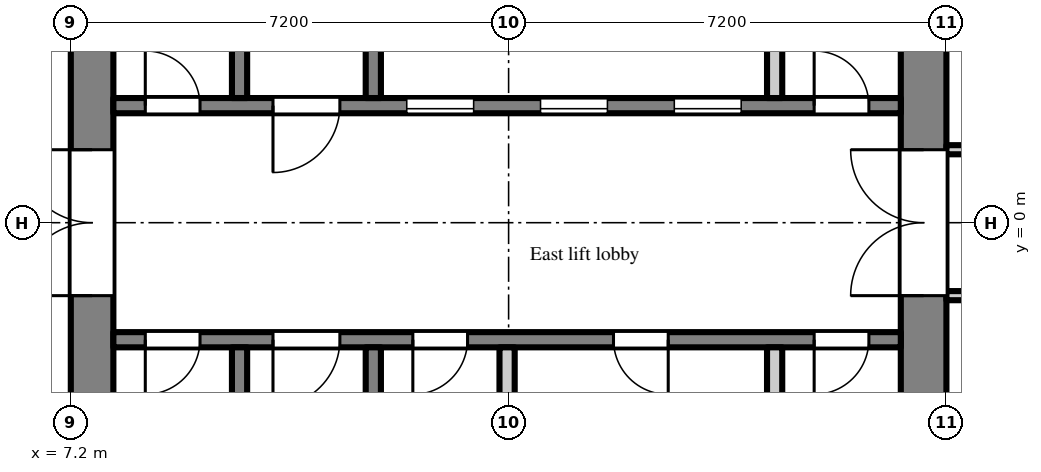
"""IFC4 building model, lengths in metres.
Left out: names, types, materials, properties, quantities, classifications, styles, units other than length and angle.
Written with IfcOpenShell. Run it as: python <this file> out.ifc"""

import sys

from ifc_helpers import new_model, si_unit, direction, frame, frame_2d, origin, place, context, subcontext, project, spatial, rectangle, extrude, element, fill, save


model = new_model("IFC4")
c1 = context("Model", 3, precision=1e-05, world=origin(), true_north=direction((0.0, 1.0)))
c2 = subcontext(c1, "Body", "Model", "MODEL_VIEW")
j1 = project(units=[si_unit("LENGTHUNIT", "METRE"), si_unit("PLANEANGLEUNIT", "RADIAN")], contexts=[c1])
p1 = place(None, origin())
s1 = spatial("IfcSite", under=j1, at=p1, CompositionType="ELEMENT")
p2 = place(p1, origin())
s2 = spatial("IfcBuilding", under=s1, at=p2, CompositionType="ELEMENT")
p3 = place(p2, frame((0.0, 0.0, 123.3)))
s3 = spatial("IfcBuildingStorey", under=s2, at=p3, CompositionType="ELEMENT", Elevation=123.3)
p4 = place(p3, frame((7.55, -7.2, 0.0), z_axis=(0.0, 0.0, 1.0), x_axis=(0.0, 1.0, 0.0)))
e1 = element("IfcWall", 1, at=p4, inside=s3, PredefinedType="SHEAR", context=c2, shape_type="SweptSolid", body=[
    extrude(rectangle(XDim=14.4, YDim=0.7, at=frame_2d((7.2, 0.0))), origin(), (0.0, 0.0, 1.0), 2.6),
])
p5 = place(p4, frame((6.0, 0.0, 0.0)))
e2 = element("IfcOpeningElement", 2, at=p5, cuts=e1, PredefinedType="OPENING", context=c2, shape_type="SweptSolid", body=[
    extrude(rectangle(XDim=2.4, YDim=2.2, at=frame_2d((1.2, 1.1))), frame((0.0, 0.36, 0.0), z_axis=(0.0, -1.0, 0.0), x_axis=(1.0, 0.0, 0.0)), (0.0, 0.0, 1.0), 0.72),
])
p6 = place(p3, frame((21.225, -7.2, 0.0), z_axis=(0.0, 0.0, 1.0), x_axis=(0.0, 1.0, 0.0)))
e3 = element("IfcWall", 3, at=p6, inside=s3, PredefinedType="SHEAR", context=c2, shape_type="SweptSolid", body=[
    extrude(rectangle(XDim=14.4, YDim=0.75, at=frame_2d((7.2, 0.0))), origin(), (0.0, 0.0, 1.0), 2.6),
])
p7 = place(p6, frame((6.0, 0.0, 0.0)))
e4 = element("IfcOpeningElement", 4, at=p7, cuts=e3, PredefinedType="OPENING", context=c2, shape_type="SweptSolid", body=[
    extrude(rectangle(XDim=2.4, YDim=2.2, at=frame_2d((1.2, 1.1))), frame((0.0, 0.385, 0.0), z_axis=(0.0, -1.0, 0.0), x_axis=(1.0, 0.0, 0.0)), (0.0, 0.0, 1.0), 0.77),
])
p8 = place(p3, frame((7.9, 1.925, 0.0), z_axis=(0.0, 0.0, 1.0), x_axis=(1.0, 0.0, 0.0)))
e5 = element("IfcWall", 5, at=p8, inside=s3, PredefinedType="SHEAR", context=c2, shape_type="SweptSolid", body=[
    extrude(rectangle(XDim=12.95, YDim=0.25, at=frame_2d((6.475, 0.0))), origin(), (0.0, 0.0, 1.0), 2.6),
])
p9 = place(p8, frame((4.825, 0.0, 0.0)))
e6 = element("IfcOpeningElement", 6, at=p9, cuts=e5, PredefinedType="OPENING", context=c2, shape_type="SweptSolid", body=[
    extrude(rectangle(XDim=1.1, YDim=2.1, at=frame_2d((0.55, 1.05))), frame((0.0, 0.135, 0.0), z_axis=(0.0, -1.0, 0.0), x_axis=(1.0, 0.0, 0.0)), (0.0, 0.0, 1.0), 0.27),
])
p10 = place(p8, frame((7.025, 0.0, 0.0)))
e7 = element("IfcOpeningElement", 7, at=p10, cuts=e5, PredefinedType="OPENING", context=c2, shape_type="SweptSolid", body=[
    extrude(rectangle(XDim=1.1, YDim=2.1, at=frame_2d((0.55, 1.05))), frame((0.0, 0.135, 0.0), z_axis=(0.0, -1.0, 0.0), x_axis=(1.0, 0.0, 0.0)), (0.0, 0.0, 1.0), 0.27),
])
p11 = place(p8, frame((9.225, 0.0, 0.0)))
e8 = element("IfcOpeningElement", 8, at=p11, cuts=e5, PredefinedType="OPENING", context=c2, shape_type="SweptSolid", body=[
    extrude(rectangle(XDim=1.1, YDim=2.1, at=frame_2d((0.55, 1.05))), frame((0.0, 0.135, 0.0), z_axis=(0.0, -1.0, 0.0), x_axis=(1.0, 0.0, 0.0)), (0.0, 0.0, 1.0), 0.27),
])
p12 = place(p8, frame((0.525, 0.0, 0.0)))
e9 = element("IfcOpeningElement", 9, at=p12, cuts=e5, PredefinedType="OPENING", context=c2, shape_type="SweptSolid", body=[
    extrude(rectangle(XDim=0.9, YDim=2.1, at=frame_2d((0.45, 1.05))), frame((0.0, 0.135, 0.0), z_axis=(0.0, -1.0, 0.0), x_axis=(1.0, 0.0, 0.0)), (0.0, 0.0, 1.0), 0.27),
])
p13 = place(p8, frame((2.625, 0.0, 0.0)))
e10 = element("IfcOpeningElement", 10, at=p13, cuts=e5, PredefinedType="OPENING", context=c2, shape_type="SweptSolid", body=[
    extrude(rectangle(XDim=1.1, YDim=2.1, at=frame_2d((0.55, 1.05))), frame((0.0, 0.135, 0.0), z_axis=(0.0, -1.0, 0.0), x_axis=(1.0, 0.0, 0.0)), (0.0, 0.0, 1.0), 0.27),
])
p14 = place(p8, frame((11.525, 0.0, 0.0)))
e11 = element("IfcOpeningElement", 11, at=p14, cuts=e5, PredefinedType="OPENING", context=c2, shape_type="SweptSolid", body=[
    extrude(rectangle(XDim=0.9, YDim=2.1, at=frame_2d((0.45, 1.05))), frame((0.0, 0.135, 0.0), z_axis=(0.0, -1.0, 0.0), x_axis=(1.0, 0.0, 0.0)), (0.0, 0.0, 1.0), 0.27),
])
p15 = place(p3, frame((9.975, 2.05, 0.0), z_axis=(0.0, 0.0, 1.0), x_axis=(0.0, 1.0, 0.0)))
e12 = element("IfcWall", 12, at=p15, inside=s3, PredefinedType="SHEAR", context=c2, shape_type="SweptSolid", body=[
    extrude(rectangle(XDim=4.7, YDim=0.25, at=frame_2d((2.35, 0.0))), origin(), (0.0, 0.0, 1.0), 2.6),
])
p16 = place(p15, frame((2.95, 0.0, 0.0)))
e13 = element("IfcOpeningElement", 13, at=p16, cuts=e12, PredefinedType="OPENING", context=c2, shape_type="SweptSolid", body=[
    extrude(rectangle(XDim=1.1, YDim=2.1, at=frame_2d((0.55, 1.05))), frame((0.0, 0.135, 0.0), z_axis=(0.0, -1.0, 0.0), x_axis=(1.0, 0.0, 0.0)), (0.0, 0.0, 1.0), 0.27),
])
p17 = place(p3, frame((12.175, 2.05, 0.0), z_axis=(0.0, 0.0, 1.0), x_axis=(0.0, 1.0, 0.0)))
e14 = element("IfcWall", 14, at=p17, inside=s3, PredefinedType="SHEAR", context=c2, shape_type="SweptSolid", body=[
    extrude(rectangle(XDim=4.7, YDim=0.25, at=frame_2d((2.35, 0.0))), origin(), (0.0, 0.0, 1.0), 2.6),
])
p18 = place(p17, frame((2.975, 0.0, 0.0)))
e15 = element("IfcOpeningElement", 15, at=p18, cuts=e14, PredefinedType="OPENING", context=c2, shape_type="SweptSolid", body=[
    extrude(rectangle(XDim=1.1, YDim=2.1, at=frame_2d((0.55, 1.05))), frame((0.0, 0.135, 0.0), z_axis=(0.0, -1.0, 0.0), x_axis=(1.0, 0.0, 0.0)), (0.0, 0.0, 1.0), 0.27),
])
p19 = place(p3, frame((18.775, 2.05, 0.0), z_axis=(0.0, 0.0, 1.0), x_axis=(0.0, 1.0, 0.0)))
e16 = element("IfcWall", 16, at=p19, inside=s3, PredefinedType="PARTITIONING", context=c2, shape_type="SweptSolid", body=[
    extrude(rectangle(XDim=2.1, YDim=0.25, at=frame_2d((1.05, 0.0))), origin(), (0.0, 0.0, 1.0), 2.6),
])
p20 = place(p3, frame((7.9, -1.925, 0.0), z_axis=(0.0, 0.0, 1.0), x_axis=(1.0, 0.0, 0.0)))
e17 = element("IfcWall", 17, at=p20, inside=s3, PredefinedType="SHEAR", context=c2, shape_type="SweptSolid", body=[
    extrude(rectangle(XDim=12.95, YDim=0.25, at=frame_2d((6.475, 0.0))), origin(), (0.0, 0.0, 1.0), 2.6),
])
p21 = place(p20, frame((0.525, 0.0, 0.0)))
e18 = element("IfcOpeningElement", 18, at=p21, cuts=e17, PredefinedType="OPENING", context=c2, shape_type="SweptSolid", body=[
    extrude(rectangle(XDim=0.9, YDim=2.1, at=frame_2d((0.45, 1.05))), frame((0.0, 0.135, 0.0), z_axis=(0.0, -1.0, 0.0), x_axis=(1.0, 0.0, 0.0)), (0.0, 0.0, 1.0), 0.27),
])
p22 = place(p20, frame((2.625, 0.0, 0.0)))
e19 = element("IfcOpeningElement", 19, at=p22, cuts=e17, PredefinedType="OPENING", context=c2, shape_type="SweptSolid", body=[
    extrude(rectangle(XDim=1.1, YDim=2.1, at=frame_2d((0.55, 1.05))), frame((0.0, 0.135, 0.0), z_axis=(0.0, -1.0, 0.0), x_axis=(1.0, 0.0, 0.0)), (0.0, 0.0, 1.0), 0.27),
])
p23 = place(p20, frame((4.925, 0.0, 0.0)))
e20 = element("IfcOpeningElement", 20, at=p23, cuts=e17, PredefinedType="OPENING", context=c2, shape_type="SweptSolid", body=[
    extrude(rectangle(XDim=0.9, YDim=2.1, at=frame_2d((0.45, 1.05))), frame((0.0, 0.135, 0.0), z_axis=(0.0, -1.0, 0.0), x_axis=(1.0, 0.0, 0.0)), (0.0, 0.0, 1.0), 0.27),
])
p24 = place(p20, frame((8.225, 0.0, 0.0)))
e21 = element("IfcOpeningElement", 21, at=p24, cuts=e17, PredefinedType="OPENING", context=c2, shape_type="SweptSolid", body=[
    extrude(rectangle(XDim=0.9, YDim=2.1, at=frame_2d((0.45, 1.05))), frame((0.0, 0.135, 0.0), z_axis=(0.0, -1.0, 0.0), x_axis=(1.0, 0.0, 0.0)), (0.0, 0.0, 1.0), 0.27),
])
p25 = place(p20, frame((11.525, 0.0, 0.0)))
e22 = element("IfcOpeningElement", 22, at=p25, cuts=e17, PredefinedType="OPENING", context=c2, shape_type="SweptSolid", body=[
    extrude(rectangle(XDim=0.9, YDim=2.1, at=frame_2d((0.45, 1.05))), frame((0.0, 0.135, 0.0), z_axis=(0.0, -1.0, 0.0), x_axis=(1.0, 0.0, 0.0)), (0.0, 0.0, 1.0), 0.27),
])
p26 = place(p3, frame((9.975, -2.05, 0.0), z_axis=(0.0, 0.0, 1.0), x_axis=(0.0, -1.0, 0.0)))
e23 = element("IfcWall", 23, at=p26, inside=s3, PredefinedType="SHEAR", context=c2, shape_type="SweptSolid", body=[
    extrude(rectangle(XDim=4.7, YDim=0.25, at=frame_2d((2.35, 0.0))), origin(), (0.0, 0.0, 1.0), 2.6),
])
p27 = place(p26, frame((2.95, 0.0, 0.0)))
e24 = element("IfcOpeningElement", 24, at=p27, cuts=e23, PredefinedType="OPENING", context=c2, shape_type="SweptSolid", body=[
    extrude(rectangle(XDim=1.1, YDim=2.1, at=frame_2d((0.55, 1.05))), frame((0.0, 0.135, 0.0), z_axis=(0.0, -1.0, 0.0), x_axis=(1.0, 0.0, 0.0)), (0.0, 0.0, 1.0), 0.27),
])
p28 = place(p3, frame((12.175, -2.05, 0.0), z_axis=(0.0, 0.0, 1.0), x_axis=(0.0, -1.0, 0.0)))
e25 = element("IfcWall", 25, at=p28, inside=s3, PredefinedType="SHEAR", context=c2, shape_type="SweptSolid", body=[
    extrude(rectangle(XDim=4.7, YDim=0.25, at=frame_2d((2.35, 0.0))), origin(), (0.0, 0.0, 1.0), 2.6),
])
p29 = place(p28, frame((2.975, 0.0, 0.0)))
e26 = element("IfcOpeningElement", 26, at=p29, cuts=e25, PredefinedType="OPENING", context=c2, shape_type="SweptSolid", body=[
    extrude(rectangle(XDim=1.1, YDim=2.1, at=frame_2d((0.55, 1.05))), frame((0.0, 0.135, 0.0), z_axis=(0.0, -1.0, 0.0), x_axis=(1.0, 0.0, 0.0)), (0.0, 0.0, 1.0), 0.27),
])
for number, where, z_axis, x_axis in (
    (27, (14.375, -2.05, 0.0), (0.0, 0.0, 1.0), (0.0, -1.0, 0.0)),
    (28, (18.775, -2.05, 0.0), (0.0, 0.0, 1.0), (0.0, -1.0, 0.0)),
):
    element("IfcWall", number, at=place(p3, frame(where, z_axis=z_axis, x_axis=x_axis)), inside=s3, PredefinedType="PARTITIONING", context=c2, shape_type="SweptSolid", body=[
        extrude(rectangle(XDim=2.1, YDim=0.25, at=frame_2d((1.05, 0.0))), origin(), (0.0, 0.0, 1.0), 2.6),
    ])
p30 = place(p3, frame((21.6, -1.2, 0.0), z_axis=(0.0, 0.0, 1.0), x_axis=(1.0, 0.0, 0.0)))
e29 = element("IfcWall", 29, at=p30, inside=s3, PredefinedType="PARTITIONING", context=c2, shape_type="SweptSolid", body=[
    extrude(rectangle(XDim=14.9, YDim=0.15, at=frame_2d((7.45, 0.0))), origin(), (0.0, 0.0, 1.0), 2.6),
])
p31 = place(p30, frame((0.45, 0.0, 0.0)))
e30 = element("IfcOpeningElement", 30, at=p31, cuts=e29, PredefinedType="OPENING", context=c2, shape_type="SweptSolid", body=[
    extrude(rectangle(XDim=0.9, YDim=2.1, at=frame_2d((0.45, 1.05))), frame((0.0, 0.085, 0.0), z_axis=(0.0, -1.0, 0.0), x_axis=(1.0, 0.0, 0.0)), (0.0, 0.0, 1.0), 0.17),
])
p32 = place(p30, frame((2.25, 0.0, 0.0)))
e31 = element("IfcOpeningElement", 31, at=p32, cuts=e29, PredefinedType="OPENING", context=c2, shape_type="SweptSolid", body=[
    extrude(rectangle(XDim=0.9, YDim=2.1, at=frame_2d((0.45, 1.05))), frame((0.0, 0.085, 0.0), z_axis=(0.0, -1.0, 0.0), x_axis=(1.0, 0.0, 0.0)), (0.0, 0.0, 1.0), 0.17),
])
p33 = place(p30, frame((5.71, 0.0, 0.0)))
e32 = element("IfcOpeningElement", 32, at=p33, cuts=e29, PredefinedType="OPENING", context=c2, shape_type="SweptSolid", body=[
    extrude(rectangle(XDim=1.0, YDim=2.1, at=frame_2d((0.5, 1.05))), frame((0.0, 0.085, 0.0), z_axis=(0.0, -1.0, 0.0), x_axis=(1.0, 0.0, 0.0)), (0.0, 0.0, 1.0), 0.17),
])
p34 = place(p30, frame((11.95, 0.0, 0.0)))
e33 = element("IfcOpeningElement", 33, at=p34, cuts=e29, PredefinedType="OPENING", context=c2, shape_type="SweptSolid", body=[
    extrude(rectangle(XDim=1.8, YDim=2.1, at=frame_2d((0.9, 1.05))), frame((0.0, 0.085, 0.0), z_axis=(0.0, -1.0, 0.0), x_axis=(1.0, 0.0, 0.0)), (0.0, 0.0, 1.0), 0.17),
])
p35 = place(p3, frame((21.6, 1.2, 0.0), z_axis=(0.0, 0.0, 1.0), x_axis=(1.0, 0.0, 0.0)))
e34 = element("IfcWall", 34, at=p35, inside=s3, PredefinedType="PARTITIONING", context=c2, shape_type="SweptSolid", body=[
    extrude(rectangle(XDim=14.9, YDim=0.15, at=frame_2d((7.45, 0.0))), origin(), (0.0, 0.0, 1.0), 2.6),
])
p36 = place(p35, frame((0.45, 0.0, 0.0)))
e35 = element("IfcOpeningElement", 35, at=p36, cuts=e34, PredefinedType="OPENING", context=c2, shape_type="SweptSolid", body=[
    extrude(rectangle(XDim=0.9, YDim=2.1, at=frame_2d((0.45, 1.05))), frame((0.0, 0.085, 0.0), z_axis=(0.0, -1.0, 0.0), x_axis=(1.0, 0.0, 0.0)), (0.0, 0.0, 1.0), 0.17),
])
p37 = place(p35, frame((2.25, 0.0, 0.0)))
e36 = element("IfcOpeningElement", 36, at=p37, cuts=e34, PredefinedType="OPENING", context=c2, shape_type="SweptSolid", body=[
    extrude(rectangle(XDim=0.9, YDim=2.1, at=frame_2d((0.45, 1.05))), frame((0.0, 0.085, 0.0), z_axis=(0.0, -1.0, 0.0), x_axis=(1.0, 0.0, 0.0)), (0.0, 0.0, 1.0), 0.17),
])
p38 = place(p35, frame((6.3, 0.0, 0.0)))
e37 = element("IfcOpeningElement", 37, at=p38, cuts=e34, PredefinedType="OPENING", context=c2, shape_type="SweptSolid", body=[
    extrude(rectangle(XDim=1.8, YDim=2.1, at=frame_2d((0.9, 1.05))), frame((0.0, 0.085, 0.0), z_axis=(0.0, -1.0, 0.0), x_axis=(1.0, 0.0, 0.0)), (0.0, 0.0, 1.0), 0.17),
])
p39 = place(p35, frame((11.95, 0.0, 0.0)))
e38 = element("IfcOpeningElement", 38, at=p39, cuts=e34, PredefinedType="OPENING", context=c2, shape_type="SweptSolid", body=[
    extrude(rectangle(XDim=1.8, YDim=2.1, at=frame_2d((0.9, 1.05))), frame((0.0, 0.085, 0.0), z_axis=(0.0, -1.0, 0.0), x_axis=(1.0, 0.0, 0.0)), (0.0, 0.0, 1.0), 0.17),
])
p40 = place(p9, origin())
e39 = element("IfcDoor", 39, at=p40, inside=s3, OperationType="SLIDING_TO_LEFT", PredefinedType="DOOR", context=c2, shape_type="SweptSolid", body=[
    extrude(rectangle(XDim=1.1, YDim=2.1, at=frame_2d((0.55, 1.05))), frame((0.0, 0.025, 0.0), z_axis=(0.0, -1.0, 0.0), x_axis=(1.0, 0.0, 0.0)), (0.0, 0.0, 1.0), 0.05),
])
fill(e6, e39)
p41 = place(p10, origin())
e40 = element("IfcDoor", 40, at=p41, inside=s3, OperationType="SLIDING_TO_LEFT", PredefinedType="DOOR", context=c2, shape_type="SweptSolid", body=[
    extrude(rectangle(XDim=1.1, YDim=2.1, at=frame_2d((0.55, 1.05))), frame((0.0, 0.025, 0.0), z_axis=(0.0, -1.0, 0.0), x_axis=(1.0, 0.0, 0.0)), (0.0, 0.0, 1.0), 0.05),
])
fill(e7, e40)
p42 = place(p11, origin())
e41 = element("IfcDoor", 41, at=p42, inside=s3, OperationType="SLIDING_TO_LEFT", PredefinedType="DOOR", context=c2, shape_type="SweptSolid", body=[
    extrude(rectangle(XDim=1.1, YDim=2.1, at=frame_2d((0.55, 1.05))), frame((0.0, 0.025, 0.0), z_axis=(0.0, -1.0, 0.0), x_axis=(1.0, 0.0, 0.0)), (0.0, 0.0, 1.0), 0.05),
])
fill(e8, e41)
p43 = place(p12, origin())
e42 = element("IfcDoor", 42, at=p43, inside=s3, OperationType="SINGLE_SWING_LEFT", PredefinedType="DOOR", context=c2, shape_type="SweptSolid", body=[
    extrude(rectangle(XDim=0.9, YDim=2.1, at=frame_2d((0.45, 1.05))), frame((0.0, 0.025, 0.0), z_axis=(0.0, -1.0, 0.0), x_axis=(1.0, 0.0, 0.0)), (0.0, 0.0, 1.0), 0.05),
])
fill(e9, e42)
p44 = place(p21, frame((0.9, 0.0, 0.0), z_axis=(0.0, 0.0, 1.0), x_axis=(-1.0, 0.0, 0.0)))
e43 = element("IfcDoor", 43, at=p44, inside=s3, OperationType="SINGLE_SWING_RIGHT", PredefinedType="DOOR", context=c2, shape_type="SweptSolid", body=[
    extrude(rectangle(XDim=0.9, YDim=2.1, at=frame_2d((0.45, 1.05))), frame((0.0, 0.025, 0.0), z_axis=(0.0, -1.0, 0.0), x_axis=(1.0, 0.0, 0.0)), (0.0, 0.0, 1.0), 0.05),
])
fill(e18, e43)
p45 = place(p13, frame((1.1, 0.0, 0.0), z_axis=(0.0, 0.0, 1.0), x_axis=(-1.0, 0.0, 0.0)))
e44 = element("IfcDoor", 44, at=p45, inside=s3, OperationType="SINGLE_SWING_RIGHT", PredefinedType="DOOR", context=c2, shape_type="SweptSolid", body=[
    extrude(rectangle(XDim=1.1, YDim=2.1, at=frame_2d((0.55, 1.05))), frame((0.0, 0.025, 0.0), z_axis=(0.0, -1.0, 0.0), x_axis=(1.0, 0.0, 0.0)), (0.0, 0.0, 1.0), 0.05),
])
fill(e10, e44)
p46 = place(p22, frame((1.1, 0.0, 0.0), z_axis=(0.0, 0.0, 1.0), x_axis=(-1.0, 0.0, 0.0)))
e45 = element("IfcDoor", 45, at=p46, inside=s3, OperationType="SINGLE_SWING_RIGHT", PredefinedType="DOOR", context=c2, shape_type="SweptSolid", body=[
    extrude(rectangle(XDim=1.1, YDim=2.1, at=frame_2d((0.55, 1.05))), frame((0.0, 0.025, 0.0), z_axis=(0.0, -1.0, 0.0), x_axis=(1.0, 0.0, 0.0)), (0.0, 0.0, 1.0), 0.05),
])
fill(e19, e45)
p47 = place(p5, origin())
e46 = element("IfcDoor", 46, at=p47, inside=s3, OperationType="DOUBLE_DOOR_DOUBLE_SWING", PredefinedType="DOOR", context=c2, shape_type="SweptSolid", body=[
    extrude(rectangle(XDim=2.4, YDim=2.2, at=frame_2d((1.2, 1.1))), frame((0.0, 0.025, 0.0), z_axis=(0.0, -1.0, 0.0), x_axis=(1.0, 0.0, 0.0)), (0.0, 0.0, 1.0), 0.05),
])
fill(e2, e46)
p48 = place(p7, origin())
e47 = element("IfcDoor", 47, at=p48, inside=s3, OperationType="DOUBLE_DOOR_DOUBLE_SWING", PredefinedType="DOOR", context=c2, shape_type="SweptSolid", body=[
    extrude(rectangle(XDim=2.4, YDim=2.2, at=frame_2d((1.2, 1.1))), frame((0.0, 0.025, 0.0), z_axis=(0.0, -1.0, 0.0), x_axis=(1.0, 0.0, 0.0)), (0.0, 0.0, 1.0), 0.05),
])
fill(e4, e47)
p49 = place(p14, origin())
e48 = element("IfcDoor", 48, at=p49, inside=s3, OperationType="SINGLE_SWING_LEFT", PredefinedType="DOOR", context=c2, shape_type="SweptSolid", body=[
    extrude(rectangle(XDim=0.9, YDim=2.1, at=frame_2d((0.45, 1.05))), frame((0.0, 0.025, 0.0), z_axis=(0.0, -1.0, 0.0), x_axis=(1.0, 0.0, 0.0)), (0.0, 0.0, 1.0), 0.05),
])
fill(e11, e48)
p50 = place(p23, frame((0.9, 0.0, 0.0), z_axis=(0.0, 0.0, 1.0), x_axis=(-1.0, 0.0, 0.0)))
e49 = element("IfcDoor", 49, at=p50, inside=s3, OperationType="SINGLE_SWING_RIGHT", PredefinedType="DOOR", context=c2, shape_type="SweptSolid", body=[
    extrude(rectangle(XDim=0.9, YDim=2.1, at=frame_2d((0.45, 1.05))), frame((0.0, 0.025, 0.0), z_axis=(0.0, -1.0, 0.0), x_axis=(1.0, 0.0, 0.0)), (0.0, 0.0, 1.0), 0.05),
])
fill(e20, e49)
p51 = place(p24, frame((0.9, 0.0, 0.0), z_axis=(0.0, 0.0, 1.0), x_axis=(-1.0, 0.0, 0.0)))
e50 = element("IfcDoor", 50, at=p51, inside=s3, OperationType="SINGLE_SWING_LEFT", PredefinedType="DOOR", context=c2, shape_type="SweptSolid", body=[
    extrude(rectangle(XDim=0.9, YDim=2.1, at=frame_2d((0.45, 1.05))), frame((0.0, 0.025, 0.0), z_axis=(0.0, -1.0, 0.0), x_axis=(1.0, 0.0, 0.0)), (0.0, 0.0, 1.0), 0.05),
])
fill(e21, e50)
p52 = place(p25, frame((0.9, 0.0, 0.0), z_axis=(0.0, 0.0, 1.0), x_axis=(-1.0, 0.0, 0.0)))
e51 = element("IfcDoor", 51, at=p52, inside=s3, OperationType="SINGLE_SWING_RIGHT", PredefinedType="DOOR", context=c2, shape_type="SweptSolid", body=[
    extrude(rectangle(XDim=0.9, YDim=2.1, at=frame_2d((0.45, 1.05))), frame((0.0, 0.025, 0.0), z_axis=(0.0, -1.0, 0.0), x_axis=(1.0, 0.0, 0.0)), (0.0, 0.0, 1.0), 0.05),
])
fill(e22, e51)
save(model, sys.argv[1])
